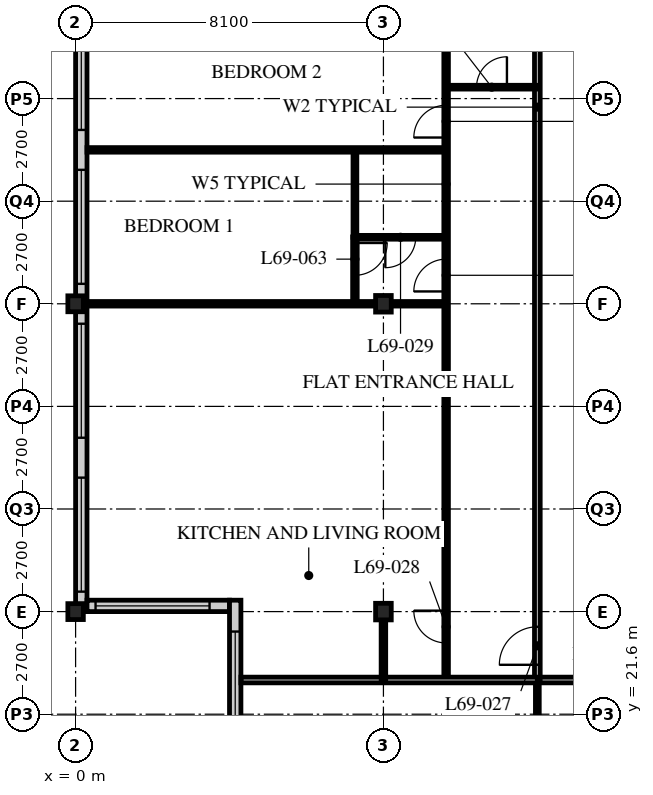
"""IFC4 building model, lengths in metres.
Left out: names, types, materials, properties, quantities, classifications, styles, units other than length and angle.
Written with IfcOpenShell. Run it as: python <this file> out.ifc"""

import sys

from ifc_helpers import new_model, si_unit, direction, frame, frame_2d, origin, origin_2d, place, context, subcontext, project, spatial, rectangle, i_section, extrude, element, fill, save


model = new_model("IFC4")
c1 = context("Model", 3, precision=1e-05, world=origin(), true_north=direction((0.0, 1.0)))
c2 = subcontext(c1, "Body", "Model", "MODEL_VIEW")
j1 = project(units=[si_unit("LENGTHUNIT", "METRE"), si_unit("PLANEANGLEUNIT", "RADIAN")], contexts=[c1])
p1 = place(None, origin())
s1 = spatial("IfcSite", under=j1, at=p1, CompositionType="ELEMENT")
p2 = place(p1, origin())
s2 = spatial("IfcBuilding", under=s1, at=p2, CompositionType="ELEMENT")
p3 = place(p2, frame((0.0, 0.0, 269.7)))
s3 = spatial("IfcBuildingStorey", under=s2, at=p3, CompositionType="ELEMENT", Elevation=269.7)
for number, where, z_axis, x_axis in (
    (1, (0.0, 24.3, 0.0), (0.0, 0.0, 1.0), (1.0, 0.0, 0.0)),
    (2, (0.0, 32.4, 0.0), (0.0, 0.0, 1.0), (1.0, 0.0, 0.0)),
):
    element("IfcColumn", number, at=place(p3, frame(where, z_axis=z_axis, x_axis=x_axis)), inside=s3, PredefinedType="COLUMN", context=c2, shape_type="SweptSolid", body=[
        extrude(i_section(OverallWidth=0.407, OverallDepth=0.419, WebThickness=0.031, FlangeThickness=0.049, FilletRadius=0.015, at=origin_2d()), origin(), (0.0, 0.0, 1.0), 3.9),
    ])
for number, where, z_axis, x_axis in (
    (3, (8.1, 24.3, 0.0), (0.0, 0.0, 1.0), (1.0, 0.0, 0.0)),
    (4, (8.1, 32.4, 0.0), (0.0, 0.0, 1.0), (1.0, 0.0, 0.0)),
):
    element("IfcColumn", number, at=place(p3, frame(where, z_axis=z_axis, x_axis=x_axis)), inside=s3, PredefinedType="COLUMN", context=c2, shape_type="SweptSolid", body=[
        extrude(i_section(OverallWidth=0.412, OverallDepth=0.437, WebThickness=0.036, FlangeThickness=0.058, FilletRadius=0.015, at=origin_2d()), origin(), (0.0, 0.0, 1.0), 3.9),
    ])
p4 = place(p3, frame((0.15, 56.4, 0.0), z_axis=(0.0, 0.0, 1.0), x_axis=(0.0, -1.0, 0.0)))
e5 = element("IfcWall", 5, at=p4, inside=s3, PredefinedType="SOLIDWALL", context=c2, shape_type="SweptSolid", body=[
    extrude(rectangle(XDim=32.1, YDim=0.3, at=frame_2d((16.05, 0.0))), origin(), (0.0, 0.0, 1.0), 3.69),
])
p5 = place(p4, frame((0.225, 0.0, 0.6)))
e6 = element("IfcOpeningElement", 6, at=p5, cuts=e5, PredefinedType="OPENING", context=c2, shape_type="SweptSolid", body=[
    extrude(rectangle(XDim=3.0, YDim=2.4, at=frame_2d((1.5, 1.2))), frame((0.0, 0.16, 0.0), z_axis=(0.0, -1.0, 0.0), x_axis=(1.0, 0.0, 0.0)), (0.0, 0.0, 1.0), 0.32),
])
p6 = place(p4, frame((4.275, 0.0, 0.6)))
e7 = element("IfcOpeningElement", 7, at=p6, cuts=e5, PredefinedType="OPENING", context=c2, shape_type="SweptSolid", body=[
    extrude(rectangle(XDim=3.0, YDim=2.4, at=frame_2d((1.5, 1.2))), frame((0.0, 0.16, 0.0), z_axis=(0.0, -1.0, 0.0), x_axis=(1.0, 0.0, 0.0)), (0.0, 0.0, 1.0), 0.32),
])
p7 = place(p4, frame((8.325, 0.0, 0.6)))
e8 = element("IfcOpeningElement", 8, at=p7, cuts=e5, PredefinedType="OPENING", context=c2, shape_type="SweptSolid", body=[
    extrude(rectangle(XDim=3.0, YDim=2.4, at=frame_2d((1.5, 1.2))), frame((0.0, 0.16, 0.0), z_axis=(0.0, -1.0, 0.0), x_axis=(1.0, 0.0, 0.0)), (0.0, 0.0, 1.0), 0.32),
])
p8 = place(p4, frame((12.375, 0.0, 0.6)))
e9 = element("IfcOpeningElement", 9, at=p8, cuts=e5, PredefinedType="OPENING", context=c2, shape_type="SweptSolid", body=[
    extrude(rectangle(XDim=3.0, YDim=2.4, at=frame_2d((1.5, 1.2))), frame((0.0, 0.16, 0.0), z_axis=(0.0, -1.0, 0.0), x_axis=(1.0, 0.0, 0.0)), (0.0, 0.0, 1.0), 0.32),
])
p9 = place(p4, frame((16.425, 0.0, 0.6)))
e10 = element("IfcOpeningElement", 10, at=p9, cuts=e5, PredefinedType="OPENING", context=c2, shape_type="SweptSolid", body=[
    extrude(rectangle(XDim=3.0, YDim=2.4, at=frame_2d((1.5, 1.2))), frame((0.0, 0.16, 0.0), z_axis=(0.0, -1.0, 0.0), x_axis=(1.0, 0.0, 0.0)), (0.0, 0.0, 1.0), 0.32),
])
p10 = place(p4, frame((20.475, 0.0, 0.6)))
e11 = element("IfcOpeningElement", 11, at=p10, cuts=e5, PredefinedType="OPENING", context=c2, shape_type="SweptSolid", body=[
    extrude(rectangle(XDim=3.0, YDim=2.4, at=frame_2d((1.5, 1.2))), frame((0.0, 0.16, 0.0), z_axis=(0.0, -1.0, 0.0), x_axis=(1.0, 0.0, 0.0)), (0.0, 0.0, 1.0), 0.32),
])
p11 = place(p4, frame((24.525, 0.0, 0.6)))
e12 = element("IfcOpeningElement", 12, at=p11, cuts=e5, PredefinedType="OPENING", context=c2, shape_type="SweptSolid", body=[
    extrude(rectangle(XDim=3.0, YDim=2.4, at=frame_2d((1.5, 1.2))), frame((0.0, 0.16, 0.0), z_axis=(0.0, -1.0, 0.0), x_axis=(1.0, 0.0, 0.0)), (0.0, 0.0, 1.0), 0.32),
])
p12 = place(p4, frame((28.575, 0.0, 0.6)))
e13 = element("IfcOpeningElement", 13, at=p12, cuts=e5, PredefinedType="OPENING", context=c2, shape_type="SweptSolid", body=[
    extrude(rectangle(XDim=3.0, YDim=2.4, at=frame_2d((1.5, 1.2))), frame((0.0, 0.16, 0.0), z_axis=(0.0, -1.0, 0.0), x_axis=(1.0, 0.0, 0.0)), (0.0, 0.0, 1.0), 0.32),
])
p13 = place(p3, frame((0.3, 24.45, 0.0), z_axis=(0.0, 0.0, 1.0), x_axis=(1.0, 0.0, 0.0)))
e14 = element("IfcWall", 14, at=p13, inside=s3, PredefinedType="SOLIDWALL", context=c2, shape_type="SweptSolid", body=[
    extrude(rectangle(XDim=3.75, YDim=0.3, at=frame_2d((1.875, 0.0))), origin(), (0.0, 0.0, 1.0), 3.69),
])
p14 = place(p13, frame((0.225, 0.0, 0.6)))
e15 = element("IfcOpeningElement", 15, at=p14, cuts=e14, PredefinedType="OPENING", context=c2, shape_type="SweptSolid", body=[
    extrude(rectangle(XDim=3.0, YDim=2.3, at=frame_2d((1.5, 1.15))), frame((0.0, 0.16, 0.0), z_axis=(0.0, -1.0, 0.0), x_axis=(1.0, 0.0, 0.0)), (0.0, 0.0, 1.0), 0.32),
])
p15 = place(p3, frame((4.2, 24.6, 0.0), z_axis=(0.0, 0.0, 1.0), x_axis=(0.0, -1.0, 0.0)))
e16 = element("IfcWall", 16, at=p15, inside=s3, PredefinedType="SOLIDWALL", context=c2, shape_type="SweptSolid", body=[
    extrude(rectangle(XDim=4.35, YDim=0.3, at=frame_2d((2.175, 0.0))), origin(), (0.0, 0.0, 1.0), 3.69),
])
p16 = place(p15, frame((0.825, 0.0, 0.6)))
e17 = element("IfcOpeningElement", 17, at=p16, cuts=e16, PredefinedType="OPENING", context=c2, shape_type="SweptSolid", body=[
    extrude(rectangle(XDim=3.0, YDim=2.3, at=frame_2d((1.5, 1.15))), frame((0.0, 0.16, 0.0), z_axis=(0.0, -1.0, 0.0), x_axis=(1.0, 0.0, 0.0)), (0.0, 0.0, 1.0), 0.32),
])
p17 = place(p3, frame((12.15, 22.5, 0.0), z_axis=(0.0, 0.0, 1.0), x_axis=(1.0, 0.0, 0.0)))
e18 = element("IfcWall", 18, at=p17, inside=s3, PredefinedType="PARTITIONING", context=c2, shape_type="SweptSolid", body=[
    extrude(rectangle(XDim=24.3, YDim=0.15, at=frame_2d((12.15, 0.0))), origin(), (0.0, 0.0, 1.0), 3.69),
])
p18 = place(p17, frame((4.45, 0.0, 0.0)))
e19 = element("IfcOpeningElement", 19, at=p18, cuts=e18, PredefinedType="OPENING", context=c2, shape_type="SweptSolid", body=[
    extrude(rectangle(XDim=1.0, YDim=2.1, at=frame_2d((0.5, 1.05))), frame((0.0, 0.085, 0.0), z_axis=(0.0, -1.0, 0.0), x_axis=(1.0, 0.0, 0.0)), (0.0, 0.0, 1.0), 0.17),
])
p19 = place(p17, frame((12.55, 0.0, 0.0)))
e20 = element("IfcOpeningElement", 20, at=p19, cuts=e18, PredefinedType="OPENING", context=c2, shape_type="SweptSolid", body=[
    extrude(rectangle(XDim=1.0, YDim=2.1, at=frame_2d((0.5, 1.05))), frame((0.0, 0.085, 0.0), z_axis=(0.0, -1.0, 0.0), x_axis=(1.0, 0.0, 0.0)), (0.0, 0.0, 1.0), 0.17),
])
p20 = place(p17, frame((2.625, 0.0, 0.0)))
e21 = element("IfcOpeningElement", 21, at=p20, cuts=e18, PredefinedType="OPENING", context=c2, shape_type="SweptSolid", body=[
    extrude(rectangle(XDim=1.0, YDim=2.1, at=frame_2d((0.5, 1.05))), frame((0.0, 0.085, 0.0), z_axis=(0.0, -1.0, 0.0), x_axis=(1.0, 0.0, 0.0)), (0.0, 0.0, 1.0), 0.17),
])
p21 = place(p3, frame((12.15, 22.5, 0.0), z_axis=(0.0, 0.0, 1.0), x_axis=(0.0, 1.0, 0.0)))
e22 = element("IfcWall", 22, at=p21, inside=s3, PredefinedType="PARTITIONING", context=c2, shape_type="SweptSolid", body=[
    extrude(rectangle(XDim=30.15, YDim=0.15, at=frame_2d((15.075, 0.0))), origin(), (0.0, 0.0, 1.0), 3.69),
])
p22 = place(p21, frame((0.4, 0.0, 0.0)))
e23 = element("IfcOpeningElement", 23, at=p22, cuts=e22, PredefinedType="OPENING", context=c2, shape_type="SweptSolid", body=[
    extrude(rectangle(XDim=1.0, YDim=2.1, at=frame_2d((0.5, 1.05))), frame((0.0, 0.085, 0.0), z_axis=(0.0, -1.0, 0.0), x_axis=(1.0, 0.0, 0.0)), (0.0, 0.0, 1.0), 0.17),
])
p23 = place(p21, frame((18.4, 0.0, 0.0)))
e24 = element("IfcOpeningElement", 24, at=p23, cuts=e22, PredefinedType="OPENING", context=c2, shape_type="SweptSolid", body=[
    extrude(rectangle(XDim=1.0, YDim=2.1, at=frame_2d((0.5, 1.05))), frame((0.0, 0.085, 0.0), z_axis=(0.0, -1.0, 0.0), x_axis=(1.0, 0.0, 0.0)), (0.0, 0.0, 1.0), 0.17),
])
p24 = place(p21, frame((28.45, 0.0, 0.0)))
e25 = element("IfcOpeningElement", 25, at=p24, cuts=e22, PredefinedType="OPENING", context=c2, shape_type="SweptSolid", body=[
    extrude(rectangle(XDim=1.0, YDim=2.1, at=frame_2d((0.5, 1.05))), frame((0.0, 0.085, 0.0), z_axis=(0.0, -1.0, 0.0), x_axis=(1.0, 0.0, 0.0)), (0.0, 0.0, 1.0), 0.17),
])
p25 = place(p3, frame((9.75, 22.5, 0.0), z_axis=(0.0, 0.0, 1.0), x_axis=(0.0, 1.0, 0.0)))
e26 = element("IfcWall", 26, at=p25, inside=s3, PredefinedType="PARTITIONING", context=c2, shape_type="SweptSolid", body=[
    extrude(rectangle(XDim=26.1, YDim=0.12, at=frame_2d((13.05, 0.0))), origin(), (0.0, 0.0, 1.0), 3.69),
])
p26 = place(p25, frame((0.975, 0.0, 0.0)))
e27 = element("IfcOpeningElement", 27, at=p26, cuts=e26, PredefinedType="OPENING", context=c2, shape_type="SweptSolid", body=[
    extrude(rectangle(XDim=0.85, YDim=2.1, at=frame_2d((0.425, 1.05))), frame((0.0, 0.07, 0.0), z_axis=(0.0, -1.0, 0.0), x_axis=(1.0, 0.0, 0.0)), (0.0, 0.0, 1.0), 0.14),
])
p27 = place(p25, frame((10.225, 0.0, 0.0)))
e28 = element("IfcOpeningElement", 28, at=p27, cuts=e26, PredefinedType="OPENING", context=c2, shape_type="SweptSolid", body=[
    extrude(rectangle(XDim=0.85, YDim=2.1, at=frame_2d((0.425, 1.05))), frame((0.0, 0.07, 0.0), z_axis=(0.0, -1.0, 0.0), x_axis=(1.0, 0.0, 0.0)), (0.0, 0.0, 1.0), 0.14),
])
p28 = place(p25, frame((14.275, 0.0, 0.0)))
e29 = element("IfcOpeningElement", 29, at=p28, cuts=e26, PredefinedType="OPENING", context=c2, shape_type="SweptSolid", body=[
    extrude(rectangle(XDim=0.85, YDim=2.1, at=frame_2d((0.425, 1.05))), frame((0.0, 0.07, 0.0), z_axis=(0.0, -1.0, 0.0), x_axis=(1.0, 0.0, 0.0)), (0.0, 0.0, 1.0), 0.14),
])
p29 = place(p25, frame((18.975, 0.0, 0.0)))
e30 = element("IfcOpeningElement", 30, at=p29, cuts=e26, PredefinedType="OPENING", context=c2, shape_type="SweptSolid", body=[
    extrude(rectangle(XDim=0.85, YDim=2.1, at=frame_2d((0.425, 1.05))), frame((0.0, 0.07, 0.0), z_axis=(0.0, -1.0, 0.0), x_axis=(1.0, 0.0, 0.0)), (0.0, 0.0, 1.0), 0.14),
])
p30 = place(p25, frame((22.375, 0.0, 0.0)))
e31 = element("IfcOpeningElement", 31, at=p30, cuts=e26, PredefinedType="OPENING", context=c2, shape_type="SweptSolid", body=[
    extrude(rectangle(XDim=0.85, YDim=2.1, at=frame_2d((0.425, 1.05))), frame((0.0, 0.07, 0.0), z_axis=(0.0, -1.0, 0.0), x_axis=(1.0, 0.0, 0.0)), (0.0, 0.0, 1.0), 0.14),
])
p31 = place(p3, frame((12.15, 38.1, 0.0), z_axis=(0.0, 0.0, 1.0), x_axis=(-1.0, 0.0, 0.0)))
e32 = element("IfcWall", 32, at=p31, inside=s3, PredefinedType="PARTITIONING", context=c2, shape_type="SweptSolid", body=[
    extrude(rectangle(XDim=2.4, YDim=0.1, at=frame_2d((1.2, 0.0))), origin(), (0.0, 0.0, 1.0), 3.69),
])
p32 = place(p31, frame((0.8, 0.0, 0.0)))
e33 = element("IfcOpeningElement", 33, at=p32, cuts=e32, PredefinedType="OPENING", context=c2, shape_type="SweptSolid", body=[
    extrude(rectangle(XDim=0.8, YDim=2.1, at=frame_2d((0.4, 1.05))), frame((0.0, 0.06, 0.0), z_axis=(0.0, -1.0, 0.0), x_axis=(1.0, 0.0, 0.0)), (0.0, 0.0, 1.0), 0.12),
])
p33 = place(p3, frame((9.75, 34.15, 0.0), z_axis=(0.0, 0.0, 1.0), x_axis=(-1.0, 0.0, 0.0)))
e34 = element("IfcWall", 34, at=p33, inside=s3, PredefinedType="PARTITIONING", context=c2, shape_type="SweptSolid", body=[
    extrude(rectangle(XDim=2.4, YDim=0.1, at=frame_2d((1.2, 0.0))), origin(), (0.0, 0.0, 1.0), 3.69),
])
p34 = place(p33, frame((0.8, 0.0, 0.0)))
e35 = element("IfcOpeningElement", 35, at=p34, cuts=e34, PredefinedType="OPENING", context=c2, shape_type="SweptSolid", body=[
    extrude(rectangle(XDim=0.8, YDim=2.1, at=frame_2d((0.4, 1.05))), frame((0.0, 0.06, 0.0), z_axis=(0.0, -1.0, 0.0), x_axis=(1.0, 0.0, 0.0)), (0.0, 0.0, 1.0), 0.12),
])
p35 = place(p3, frame((7.35, 34.15, 0.0), z_axis=(0.0, 0.0, 1.0), x_axis=(0.0, 1.0, 0.0)))
e36 = element("IfcWall", 36, at=p35, inside=s3, PredefinedType="PARTITIONING", context=c2, shape_type="SweptSolid", body=[
    extrude(rectangle(XDim=2.3, YDim=0.1, at=frame_2d((1.15, 0.0))), origin(), (0.0, 0.0, 1.0), 3.69),
])
p36 = place(p3, frame((9.75, 32.4, 0.0), z_axis=(0.0, 0.0, 1.0), x_axis=(-1.0, 0.0, 0.0)))
e37 = element("IfcWall", 37, at=p36, inside=s3, PredefinedType="PARTITIONING", context=c2, shape_type="SweptSolid", body=[
    extrude(rectangle(XDim=9.45, YDim=0.12, at=frame_2d((4.725, 0.0))), origin(), (0.0, 0.0, 1.0), 3.078),
])
p37 = place(p3, frame((9.75, 36.45, 0.0), z_axis=(0.0, 0.0, 1.0), x_axis=(-1.0, 0.0, 0.0)))
e38 = element("IfcWall", 38, at=p37, inside=s3, PredefinedType="PARTITIONING", context=c2, shape_type="SweptSolid", body=[
    extrude(rectangle(XDim=9.45, YDim=0.12, at=frame_2d((4.725, 0.0))), origin(), (0.0, 0.0, 1.0), 3.69),
])
p38 = place(p3, frame((12.15, 22.5, 0.0), z_axis=(0.0, 0.0, 1.0), x_axis=(0.0, -1.0, 0.0)))
e39 = element("IfcWall", 39, at=p38, inside=s3, PredefinedType="PARTITIONING", context=c2, shape_type="SweptSolid", body=[
    extrude(rectangle(XDim=2.4, YDim=0.1, at=frame_2d((1.2, 0.0))), origin(), (0.0, 0.0, 1.0), 3.69),
])
p39 = place(p3, frame((4.35, 22.5, 0.0), z_axis=(0.0, 0.0, 1.0), x_axis=(1.0, 0.0, 0.0)))
e40 = element("IfcWall", 40, at=p39, inside=s3, PredefinedType="PARTITIONING", context=c2, shape_type="SweptSolid", body=[
    extrude(rectangle(XDim=7.8, YDim=0.15, at=frame_2d((3.9, 0.0))), origin(), (0.0, 0.0, 1.0), 3.69),
])
p40 = place(p3, frame((7.35, 32.4, 0.0), z_axis=(0.0, 0.0, 1.0), x_axis=(0.0, 1.0, 0.0)))
e41 = element("IfcWall", 41, at=p40, inside=s3, PredefinedType="PARTITIONING", context=c2, shape_type="SweptSolid", body=[
    extrude(rectangle(XDim=1.76, YDim=0.12, at=frame_2d((0.88, 0.0))), origin(), (0.0, 0.0, 1.0), 3.69),
])
p41 = place(p40, frame((0.75, 0.0, 0.0)))
e42 = element("IfcOpeningElement", 42, at=p41, cuts=e41, PredefinedType="OPENING", context=c2, shape_type="SweptSolid", body=[
    extrude(rectangle(XDim=0.85, YDim=2.1, at=frame_2d((0.425, 1.05))), frame((0.0, 0.07, 0.0), z_axis=(0.0, -1.0, 0.0), x_axis=(1.0, 0.0, 0.0)), (0.0, 0.0, 1.0), 0.14),
])
p42 = place(p3, frame((8.1, 22.5, 0.0), z_axis=(0.0, 0.0, 1.0), x_axis=(0.0, 1.0, 0.0)))
e43 = element("IfcWall", 43, at=p42, inside=s3, PredefinedType="PARTITIONING", context=c2, shape_type="SweptSolid", body=[
    extrude(rectangle(XDim=1.597, YDim=0.12, at=frame_2d((0.798, 0.0))), origin(), (0.0, 0.0, 1.0), 3.078),
])
p43 = place(p9, origin())
e44 = element("IfcWindow", 44, at=p43, inside=s3, PartitioningType="SINGLE_PANEL", PredefinedType="WINDOW", context=c2, shape_type="SweptSolid", body=[
    extrude(rectangle(XDim=3.0, YDim=2.4, at=frame_2d((1.5, 1.2))), frame((0.0, 0.03, 0.0), z_axis=(0.0, -1.0, 0.0), x_axis=(1.0, 0.0, 0.0)), (0.0, 0.0, 1.0), 0.06),
])
fill(e10, e44)
p44 = place(p10, origin())
e45 = element("IfcWindow", 45, at=p44, inside=s3, PartitioningType="SINGLE_PANEL", PredefinedType="WINDOW", context=c2, shape_type="SweptSolid", body=[
    extrude(rectangle(XDim=3.0, YDim=2.4, at=frame_2d((1.5, 1.2))), frame((0.0, 0.03, 0.0), z_axis=(0.0, -1.0, 0.0), x_axis=(1.0, 0.0, 0.0)), (0.0, 0.0, 1.0), 0.06),
])
fill(e11, e45)
p45 = place(p11, origin())
e46 = element("IfcWindow", 46, at=p45, inside=s3, PartitioningType="SINGLE_PANEL", PredefinedType="WINDOW", context=c2, shape_type="SweptSolid", body=[
    extrude(rectangle(XDim=3.0, YDim=2.4, at=frame_2d((1.5, 1.2))), frame((0.0, 0.03, 0.0), z_axis=(0.0, -1.0, 0.0), x_axis=(1.0, 0.0, 0.0)), (0.0, 0.0, 1.0), 0.06),
])
fill(e12, e46)
p46 = place(p12, origin())
e47 = element("IfcWindow", 47, at=p46, inside=s3, PartitioningType="SINGLE_PANEL", PredefinedType="WINDOW", context=c2, shape_type="SweptSolid", body=[
    extrude(rectangle(XDim=3.0, YDim=2.4, at=frame_2d((1.5, 1.2))), frame((0.0, 0.03, 0.0), z_axis=(0.0, -1.0, 0.0), x_axis=(1.0, 0.0, 0.0)), (0.0, 0.0, 1.0), 0.06),
])
fill(e13, e47)
p47 = place(p14, origin())
e48 = element("IfcWindow", 48, at=p47, inside=s3, PartitioningType="SINGLE_PANEL", PredefinedType="WINDOW", context=c2, shape_type="SweptSolid", body=[
    extrude(rectangle(XDim=3.0, YDim=2.3, at=frame_2d((1.5, 1.15))), frame((0.0, 0.03, 0.0), z_axis=(0.0, -1.0, 0.0), x_axis=(1.0, 0.0, 0.0)), (0.0, 0.0, 1.0), 0.06),
])
fill(e15, e48)
p48 = place(p16, origin())
e49 = element("IfcWindow", 49, at=p48, inside=s3, PartitioningType="SINGLE_PANEL", PredefinedType="WINDOW", context=c2, shape_type="SweptSolid", body=[
    extrude(rectangle(XDim=3.0, YDim=2.3, at=frame_2d((1.5, 1.15))), frame((0.0, 0.03, 0.0), z_axis=(0.0, -1.0, 0.0), x_axis=(1.0, 0.0, 0.0)), (0.0, 0.0, 1.0), 0.06),
])
fill(e17, e49)
p49 = place(p32, origin())
e50 = element("IfcDoor", 50, at=p49, inside=s3, OperationType="SINGLE_SWING_RIGHT", PredefinedType="DOOR", context=c2, shape_type="SweptSolid", body=[
    extrude(rectangle(XDim=0.8, YDim=2.1, at=frame_2d((0.4, 1.05))), frame((0.0, 0.025, 0.0), z_axis=(0.0, -1.0, 0.0), x_axis=(1.0, 0.0, 0.0)), (0.0, 0.0, 1.0), 0.05),
])
fill(e33, e50)
p50 = place(p22, origin())
e51 = element("IfcDoor", 51, at=p50, inside=s3, OperationType="SINGLE_SWING_LEFT", PredefinedType="DOOR", context=c2, shape_type="SweptSolid", body=[
    extrude(rectangle(XDim=1.0, YDim=2.1, at=frame_2d((0.5, 1.05))), frame((0.0, 0.025, 0.0), z_axis=(0.0, -1.0, 0.0), x_axis=(1.0, 0.0, 0.0)), (0.0, 0.0, 1.0), 0.05),
])
fill(e23, e51)
p51 = place(p26, origin())
e52 = element("IfcDoor", 52, at=p51, inside=s3, OperationType="SINGLE_SWING_RIGHT", PredefinedType="DOOR", context=c2, shape_type="SweptSolid", body=[
    extrude(rectangle(XDim=0.85, YDim=2.1, at=frame_2d((0.425, 1.05))), frame((0.0, 0.025, 0.0), z_axis=(0.0, -1.0, 0.0), x_axis=(1.0, 0.0, 0.0)), (0.0, 0.0, 1.0), 0.05),
])
fill(e27, e52)
p52 = place(p34, origin())
e53 = element("IfcDoor", 53, at=p52, inside=s3, OperationType="SINGLE_SWING_RIGHT", PredefinedType="DOOR", context=c2, shape_type="SweptSolid", body=[
    extrude(rectangle(XDim=0.8, YDim=2.1, at=frame_2d((0.4, 1.05))), frame((0.0, 0.025, 0.0), z_axis=(0.0, -1.0, 0.0), x_axis=(1.0, 0.0, 0.0)), (0.0, 0.0, 1.0), 0.05),
])
fill(e35, e53)
p53 = place(p27, origin())
e54 = element("IfcDoor", 54, at=p53, inside=s3, OperationType="SINGLE_SWING_LEFT", PredefinedType="DOOR", context=c2, shape_type="SweptSolid", body=[
    extrude(rectangle(XDim=0.85, YDim=2.1, at=frame_2d((0.425, 1.05))), frame((0.0, 0.025, 0.0), z_axis=(0.0, -1.0, 0.0), x_axis=(1.0, 0.0, 0.0)), (0.0, 0.0, 1.0), 0.05),
])
fill(e28, e54)
p54 = place(p28, origin())
e55 = element("IfcDoor", 55, at=p54, inside=s3, OperationType="SINGLE_SWING_LEFT", PredefinedType="DOOR", context=c2, shape_type="SweptSolid", body=[
    extrude(rectangle(XDim=0.85, YDim=2.1, at=frame_2d((0.425, 1.05))), frame((0.0, 0.025, 0.0), z_axis=(0.0, -1.0, 0.0), x_axis=(1.0, 0.0, 0.0)), (0.0, 0.0, 1.0), 0.05),
])
fill(e29, e55)
p55 = place(p41, origin())
e56 = element("IfcDoor", 56, at=p55, inside=s3, OperationType="SINGLE_SWING_LEFT", PredefinedType="DOOR", context=c2, shape_type="SweptSolid", body=[
    extrude(rectangle(XDim=0.85, YDim=2.1, at=frame_2d((0.425, 1.05))), frame((0.0, 0.025, 0.0), z_axis=(0.0, -1.0, 0.0), x_axis=(1.0, 0.0, 0.0)), (0.0, 0.0, 1.0), 0.05),
])
fill(e42, e56)
save(model, sys.argv[1])
